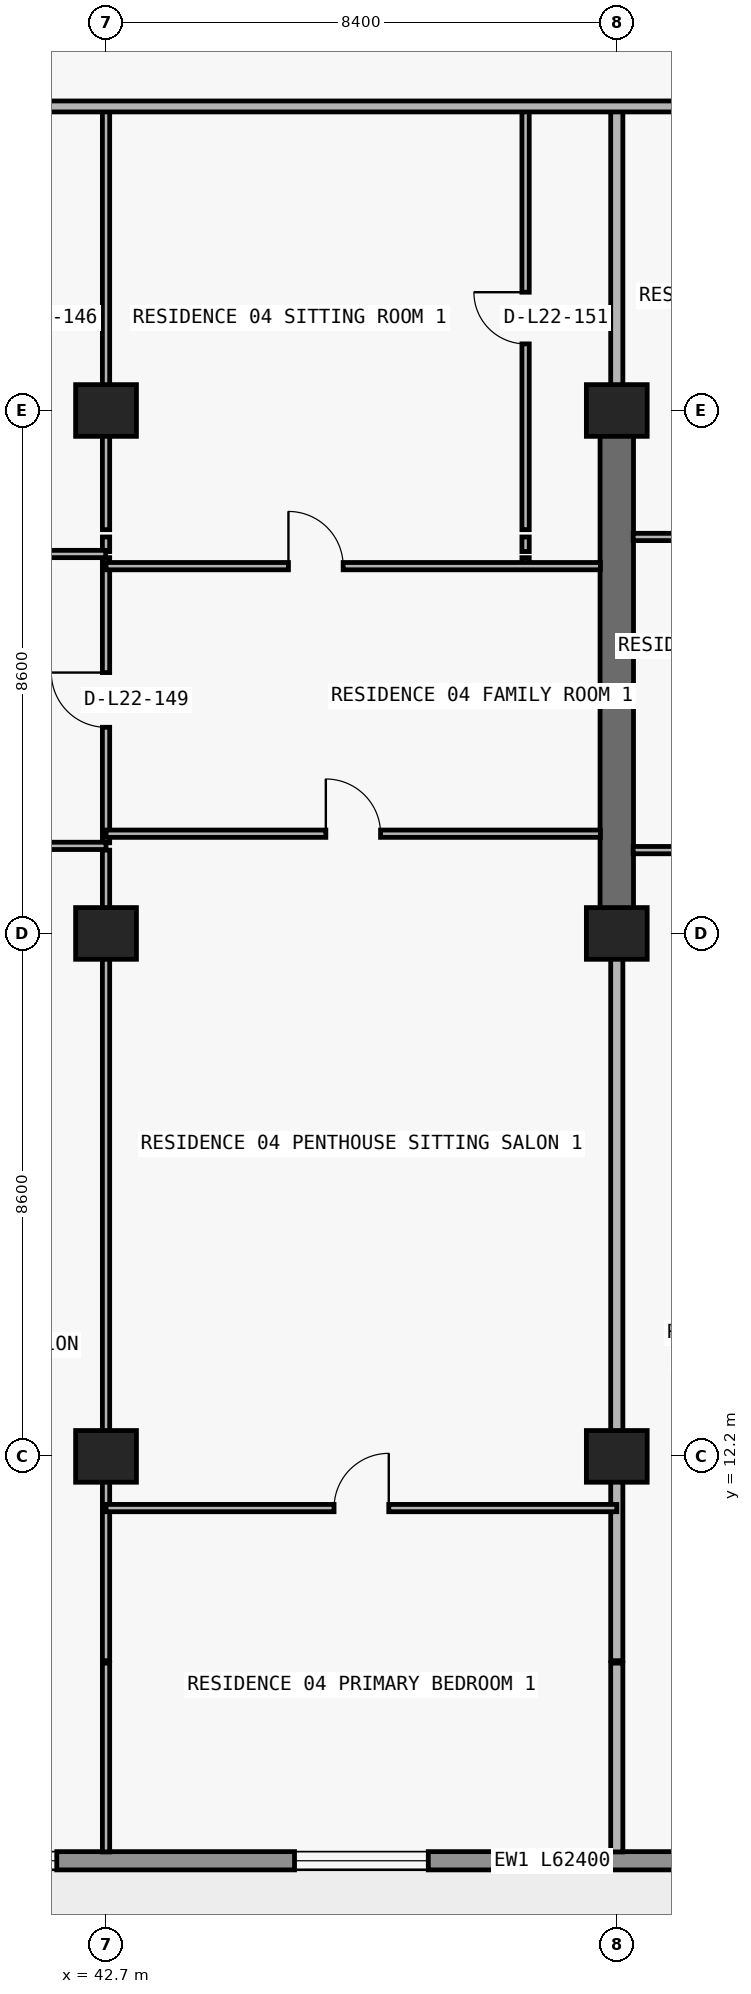
"""IFC4 building model, lengths in metres.
Left out: names, types, materials, properties, quantities, classifications, styles, units other than length and angle.
Written with IfcOpenShell. Run it as: python <this file> out.ifc"""

import sys

from ifc_helpers import new_model, si_unit, direction, frame, frame_2d, origin, origin_2d, place, context, subcontext, project, spatial, rectangle, extrude, element, fill, save


model = new_model("IFC4")
c1 = context("Model", 3, precision=1e-05, world=origin(), true_north=direction((0.0, 1.0)))
c2 = subcontext(c1, "Body", "Model", "MODEL_VIEW")
j1 = project(units=[si_unit("LENGTHUNIT", "METRE"), si_unit("PLANEANGLEUNIT", "RADIAN")], contexts=[c1])
p1 = place(None, origin())
s1 = spatial("IfcSite", under=j1, at=p1, CompositionType="ELEMENT")
p2 = place(p1, origin())
s2 = spatial("IfcBuilding", under=s1, at=p2, CompositionType="ELEMENT")
p3 = place(p2, frame((0.0, 0.0, 84.6)))
s3 = spatial("IfcBuildingStorey", under=s2, at=p3, CompositionType="ELEMENT", Elevation=84.6)
for number, where, z_axis, x_axis in (
    (1, (42.7, 12.2, 0.0), (0.0, 0.0, 1.0), (1.0, 0.0, 0.0)),
    (2, (51.1, 12.2, 0.0), (0.0, 0.0, 1.0), (1.0, 0.0, 0.0)),
    (3, (42.7, 20.8, 0.0), (0.0, 0.0, 1.0), (1.0, 0.0, 0.0)),
    (4, (51.1, 20.8, 0.0), (0.0, 0.0, 1.0), (1.0, 0.0, 0.0)),
    (5, (42.7, 29.4, 0.0), (0.0, 0.0, 1.0), (1.0, 0.0, 0.0)),
    (6, (51.1, 29.4, 0.0), (0.0, 0.0, 1.0), (1.0, 0.0, 0.0)),
):
    element("IfcColumn", number, at=place(p3, frame(where, z_axis=z_axis, x_axis=x_axis)), inside=s3, PredefinedType="COLUMN", context=c2, shape_type="SweptSolid", body=[
        extrude(rectangle(XDim=1.0, YDim=0.85, at=origin_2d()), origin(), (0.0, 0.0, 1.0), 3.05),
    ])
p4 = place(p3, frame((51.1, 20.8, 0.0), z_axis=(0.0, 0.0, 1.0), x_axis=(0.0, 1.0, 0.0)))
e7 = element("IfcWall", 7, at=p4, inside=s3, PredefinedType="SHEAR", context=c2, shape_type="SweptSolid", body=[
    extrude(rectangle(XDim=8.6, YDim=0.55, at=frame_2d((4.3, 0.0))), origin(), (0.0, 0.0, 1.0), 3.05),
])
p5 = place(p3, frame((70.1, 5.55, 0.0), z_axis=(0.0, 0.0, 1.0), x_axis=(-1.0, 0.0, 0.0)))
e8 = element("IfcWall", 8, at=p5, inside=s3, PredefinedType="STANDARD", context=c2, shape_type="SweptSolid", body=[
    extrude(rectangle(XDim=62.4, YDim=0.3, at=frame_2d((31.2, 0.0))), origin(), (0.0, 0.0, 1.0), 3.05),
])
p6 = place(p5, frame((57.226, 0.0, 0.0)))
e9 = element("IfcOpeningElement", 9, at=p6, cuts=e8, PredefinedType="OPENING", context=c2, shape_type="SweptSolid", body=[
    extrude(rectangle(XDim=2.0, YDim=2.3, at=frame_2d((1.0, 1.15))), frame((0.0, 0.16, 0.0), z_axis=(0.0, -1.0, 0.0), x_axis=(1.0, 0.0, 0.0)), (0.0, 0.0, 1.0), 0.32),
])
p7 = place(p5, frame((52.926, 0.0, 0.85)))
e10 = element("IfcOpeningElement", 10, at=p7, cuts=e8, PredefinedType="OPENING", context=c2, shape_type="SweptSolid", body=[
    extrude(rectangle(XDim=2.2, YDim=1.55, at=frame_2d((1.1, 0.775))), frame((0.0, 0.16, 0.0), z_axis=(0.0, -1.0, 0.0), x_axis=(1.0, 0.0, 0.0)), (0.0, 0.0, 1.0), 0.32),
])
p8 = place(p5, frame((48.49, 0.0, 0.0)))
e11 = element("IfcOpeningElement", 11, at=p8, cuts=e8, PredefinedType="OPENING", context=c2, shape_type="SweptSolid", body=[
    extrude(rectangle(XDim=2.0, YDim=2.3, at=frame_2d((1.0, 1.15))), frame((0.0, 0.16, 0.0), z_axis=(0.0, -1.0, 0.0), x_axis=(1.0, 0.0, 0.0)), (0.0, 0.0, 1.0), 0.32),
])
p9 = place(p5, frame((44.39, 0.0, 0.85)))
e12 = element("IfcOpeningElement", 12, at=p9, cuts=e8, PredefinedType="OPENING", context=c2, shape_type="SweptSolid", body=[
    extrude(rectangle(XDim=1.8, YDim=1.55, at=frame_2d((0.9, 0.775))), frame((0.0, 0.16, 0.0), z_axis=(0.0, -1.0, 0.0), x_axis=(1.0, 0.0, 0.0)), (0.0, 0.0, 1.0), 0.32),
])
p10 = place(p5, frame((40.426, 0.0, 0.0)))
e13 = element("IfcOpeningElement", 13, at=p10, cuts=e8, PredefinedType="OPENING", context=c2, shape_type="SweptSolid", body=[
    extrude(rectangle(XDim=2.0, YDim=2.3, at=frame_2d((1.0, 1.15))), frame((0.0, 0.16, 0.0), z_axis=(0.0, -1.0, 0.0), x_axis=(1.0, 0.0, 0.0)), (0.0, 0.0, 1.0), 0.32),
])
p11 = place(p5, frame((36.126, 0.0, 0.85)))
e14 = element("IfcOpeningElement", 14, at=p11, cuts=e8, PredefinedType="OPENING", context=c2, shape_type="SweptSolid", body=[
    extrude(rectangle(XDim=2.2, YDim=1.55, at=frame_2d((1.1, 0.775))), frame((0.0, 0.16, 0.0), z_axis=(0.0, -1.0, 0.0), x_axis=(1.0, 0.0, 0.0)), (0.0, 0.0, 1.0), 0.32),
])
p12 = place(p5, frame((32.09, 0.0, 0.0)))
e15 = element("IfcOpeningElement", 15, at=p12, cuts=e8, PredefinedType="OPENING", context=c2, shape_type="SweptSolid", body=[
    extrude(rectangle(XDim=2.0, YDim=2.3, at=frame_2d((1.0, 1.15))), frame((0.0, 0.16, 0.0), z_axis=(0.0, -1.0, 0.0), x_axis=(1.0, 0.0, 0.0)), (0.0, 0.0, 1.0), 0.32),
])
p13 = place(p5, frame((28.21, 0.0, 0.65)))
e16 = element("IfcOpeningElement", 16, at=p13, cuts=e8, PredefinedType="OPENING", context=c2, shape_type="SweptSolid", body=[
    extrude(rectangle(XDim=2.6, YDim=1.85, at=frame_2d((1.3, 0.925))), frame((0.0, 0.16, 0.0), z_axis=(0.0, -1.0, 0.0), x_axis=(1.0, 0.0, 0.0)), (0.0, 0.0, 1.0), 0.32),
])
p14 = place(p5, frame((22.1, 0.0, 0.85)))
e17 = element("IfcOpeningElement", 17, at=p14, cuts=e8, PredefinedType="OPENING", context=c2, shape_type="SweptSolid", body=[
    extrude(rectangle(XDim=2.2, YDim=1.55, at=frame_2d((1.1, 0.775))), frame((0.0, 0.16, 0.0), z_axis=(0.0, -1.0, 0.0), x_axis=(1.0, 0.0, 0.0)), (0.0, 0.0, 1.0), 0.32),
])
p15 = place(p5, frame((16.026, 0.0, 0.0)))
e18 = element("IfcOpeningElement", 18, at=p15, cuts=e8, PredefinedType="OPENING", context=c2, shape_type="SweptSolid", body=[
    extrude(rectangle(XDim=2.0, YDim=2.3, at=frame_2d((1.0, 1.15))), frame((0.0, 0.16, 0.0), z_axis=(0.0, -1.0, 0.0), x_axis=(1.0, 0.0, 0.0)), (0.0, 0.0, 1.0), 0.32),
])
p16 = place(p5, frame((11.726, 0.0, 0.85)))
e19 = element("IfcOpeningElement", 19, at=p16, cuts=e8, PredefinedType="OPENING", context=c2, shape_type="SweptSolid", body=[
    extrude(rectangle(XDim=2.2, YDim=1.55, at=frame_2d((1.1, 0.775))), frame((0.0, 0.16, 0.0), z_axis=(0.0, -1.0, 0.0), x_axis=(1.0, 0.0, 0.0)), (0.0, 0.0, 1.0), 0.32),
])
p17 = place(p5, frame((7.29, 0.0, 0.0)))
e20 = element("IfcOpeningElement", 20, at=p17, cuts=e8, PredefinedType="OPENING", context=c2, shape_type="SweptSolid", body=[
    extrude(rectangle(XDim=2.0, YDim=2.3, at=frame_2d((1.0, 1.15))), frame((0.0, 0.16, 0.0), z_axis=(0.0, -1.0, 0.0), x_axis=(1.0, 0.0, 0.0)), (0.0, 0.0, 1.0), 0.32),
])
p18 = place(p5, frame((3.19, 0.0, 0.85)))
e21 = element("IfcOpeningElement", 21, at=p18, cuts=e8, PredefinedType="OPENING", context=c2, shape_type="SweptSolid", body=[
    extrude(rectangle(XDim=1.8, YDim=1.55, at=frame_2d((0.9, 0.775))), frame((0.0, 0.16, 0.0), z_axis=(0.0, -1.0, 0.0), x_axis=(1.0, 0.0, 0.0)), (0.0, 0.0, 1.0), 0.32),
])
p19 = place(p3, frame((42.7, 5.695, 0.0), z_axis=(0.0, 0.0, 1.0), x_axis=(0.0, 1.0, 0.0)))
e22 = element("IfcWall", 22, at=p19, inside=s3, PredefinedType="PARTITIONING", context=c2, shape_type="SweptSolid", body=[
    extrude(rectangle(XDim=3.105, YDim=0.12, at=frame_2d((1.552, 0.0))), origin(), (0.0, 0.0, 1.0), 3.05),
])
p20 = place(p3, frame((42.7, 8.84, 0.0), z_axis=(0.0, 0.0, 1.0), x_axis=(0.0, 1.0, 0.0)))
e23 = element("IfcWall", 23, at=p20, inside=s3, PredefinedType="PARTITIONING", context=c2, shape_type="SweptSolid", body=[
    extrude(rectangle(XDim=13.33, YDim=0.12, at=frame_2d((6.665, 0.0))), origin(), (0.0, 0.0, 1.0), 2.174),
])
p21 = place(p3, frame((42.7, 22.29, 0.0), z_axis=(0.0, 0.0, 1.0), x_axis=(0.0, 1.0, 0.0)))
e24 = element("IfcWall", 24, at=p21, inside=s3, PredefinedType="PARTITIONING", context=c2, shape_type="SweptSolid", body=[
    extrude(rectangle(XDim=4.69, YDim=0.12, at=frame_2d((2.345, 0.0))), origin(), (0.0, 0.0, 1.0), 2.174),
])
p22 = place(p21, frame((1.9, 0.0, 0.0)))
e25 = element("IfcOpeningElement", 25, at=p22, cuts=e24, PredefinedType="OPENING", context=c2, shape_type="SweptSolid", body=[
    extrude(rectangle(XDim=0.9, YDim=2.124, at=frame_2d((0.45, 1.062))), frame((0.0, 0.07, 0.0), z_axis=(0.0, -1.0, 0.0), x_axis=(1.0, 0.0, 0.0)), (0.0, 0.0, 1.0), 0.14),
])
p23 = place(p3, frame((42.7, 27.08, 0.0), z_axis=(0.0, 0.0, 1.0), x_axis=(0.0, 1.0, 0.0)))
e26 = element("IfcWall", 26, at=p23, inside=s3, PredefinedType="PARTITIONING", context=c2, shape_type="SweptSolid", body=[
    extrude(rectangle(XDim=0.24, YDim=0.12, at=frame_2d((0.12, 0.0))), origin(), (0.0, 0.0, 1.0), 2.174),
])
p24 = place(p3, frame((42.7, 27.44, 0.0), z_axis=(0.0, 0.0, 1.0), x_axis=(0.0, 1.0, 0.0)))
e27 = element("IfcWall", 27, at=p24, inside=s3, PredefinedType="PARTITIONING", context=c2, shape_type="SweptSolid", body=[
    extrude(rectangle(XDim=6.96, YDim=0.12, at=frame_2d((3.48, 0.0))), origin(), (0.0, 0.0, 1.0), 2.174),
])
p25 = place(p3, frame((49.6, 26.84, 0.0), z_axis=(0.0, 0.0, 1.0), x_axis=(0.0, 1.0, 0.0)))
e28 = element("IfcWall", 28, at=p25, inside=s3, PredefinedType="PARTITIONING", context=c2, shape_type="SweptSolid", body=[
    extrude(rectangle(XDim=0.14, YDim=0.12, at=frame_2d((0.07, 0.0))), origin(), (0.0, 0.0, 1.0), 3.05),
])
p26 = place(p3, frame((49.6, 27.08, 0.0), z_axis=(0.0, 0.0, 1.0), x_axis=(0.0, 1.0, 0.0)))
e29 = element("IfcWall", 29, at=p26, inside=s3, PredefinedType="PARTITIONING", context=c2, shape_type="SweptSolid", body=[
    extrude(rectangle(XDim=0.24, YDim=0.12, at=frame_2d((0.12, 0.0))), origin(), (0.0, 0.0, 1.0), 3.05),
])
p27 = place(p3, frame((49.6, 27.44, 0.0), z_axis=(0.0, 0.0, 1.0), x_axis=(0.0, 1.0, 0.0)))
e30 = element("IfcWall", 30, at=p27, inside=s3, PredefinedType="PARTITIONING", context=c2, shape_type="SweptSolid", body=[
    extrude(rectangle(XDim=6.96, YDim=0.12, at=frame_2d((3.48, 0.0))), origin(), (0.0, 0.0, 1.0), 3.05),
])
p28 = place(p27, frame((3.055, 0.0, 0.0)))
e31 = element("IfcOpeningElement", 31, at=p28, cuts=e30, PredefinedType="OPENING", context=c2, shape_type="SweptSolid", body=[
    extrude(rectangle(XDim=0.85, YDim=2.1, at=frame_2d((0.425, 1.05))), frame((0.0, 0.07, 0.0), z_axis=(0.0, -1.0, 0.0), x_axis=(1.0, 0.0, 0.0)), (0.0, 0.0, 1.0), 0.14),
])
p29 = place(p3, frame((51.1, 5.695, 0.0), z_axis=(0.0, 0.0, 1.0), x_axis=(0.0, 1.0, 0.0)))
e32 = element("IfcWall", 32, at=p29, inside=s3, PredefinedType="PARTITIONING", context=c2, shape_type="SweptSolid", body=[
    extrude(rectangle(XDim=3.105, YDim=0.2, at=frame_2d((1.552, 0.0))), origin(), (0.0, 0.0, 1.0), 3.05),
])
p30 = place(p3, frame((51.1, 8.84, 0.0), z_axis=(0.0, 0.0, 1.0), x_axis=(0.0, 1.0, 0.0)))
e33 = element("IfcWall", 33, at=p30, inside=s3, PredefinedType="PARTITIONING", context=c2, shape_type="SweptSolid", body=[
    extrude(rectangle(XDim=11.955, YDim=0.2, at=frame_2d((5.978, 0.0))), origin(), (0.0, 0.0, 1.0), 2.174),
])
p31 = place(p3, frame((51.1, 29.405, 0.0), z_axis=(0.0, 0.0, 1.0), x_axis=(0.0, 1.0, 0.0)))
e34 = element("IfcWall", 34, at=p31, inside=s3, PredefinedType="PARTITIONING", context=c2, shape_type="SweptSolid", body=[
    extrude(rectangle(XDim=4.995, YDim=0.2, at=frame_2d((2.498, 0.0))), origin(), (0.0, 0.0, 1.0), 2.335),
])
p32 = place(p3, frame((42.7, 11.35, 0.0), z_axis=(0.0, 0.0, 1.0), x_axis=(1.0, 0.0, 0.0)))
e35 = element("IfcWall", 35, at=p32, inside=s3, PredefinedType="PARTITIONING", context=c2, shape_type="SweptSolid", body=[
    extrude(rectangle(XDim=8.4, YDim=0.12, at=frame_2d((4.2, 0.0))), origin(), (0.0, 0.0, 1.0), 3.05),
])
p33 = place(p32, frame((3.75, 0.0, 0.0)))
e36 = element("IfcOpeningElement", 36, at=p33, cuts=e35, PredefinedType="OPENING", context=c2, shape_type="SweptSolid", body=[
    extrude(rectangle(XDim=0.9, YDim=2.15, at=frame_2d((0.45, 1.075))), frame((0.0, 0.07, 0.0), z_axis=(0.0, -1.0, 0.0), x_axis=(1.0, 0.0, 0.0)), (0.0, 0.0, 1.0), 0.14),
])
p34 = place(p3, frame((51.37, 22.17, 0.0), z_axis=(0.0, 0.0, 1.0), x_axis=(1.0, 0.0, 0.0)))
e37 = element("IfcWall", 37, at=p34, inside=s3, PredefinedType="PARTITIONING", context=c2, shape_type="SweptSolid", body=[
    extrude(rectangle(XDim=4.516, YDim=0.12, at=frame_2d((2.258, 0.0))), origin(), (0.0, 0.0, 1.0), 3.05),
])
p35 = place(p34, frame((1.389, 0.0, 0.0)))
e38 = element("IfcOpeningElement", 38, at=p35, cuts=e37, PredefinedType="OPENING", context=c2, shape_type="SweptSolid", body=[
    extrude(rectangle(XDim=0.9, YDim=2.15, at=frame_2d((0.45, 1.075))), frame((0.0, 0.07, 0.0), z_axis=(0.0, -1.0, 0.0), x_axis=(1.0, 0.0, 0.0)), (0.0, 0.0, 1.0), 0.14),
])
p36 = place(p3, frame((35.1, 22.24, 0.0), z_axis=(0.0, 0.0, 1.0), x_axis=(1.0, 0.0, 0.0)))
e39 = element("IfcWall", 39, at=p36, inside=s3, PredefinedType="PARTITIONING", context=c2, shape_type="SweptSolid", body=[
    extrude(rectangle(XDim=7.6, YDim=0.12, at=frame_2d((3.8, 0.0))), origin(), (0.0, 0.0, 1.0), 3.05),
])
p37 = place(p36, frame((3.35, 0.0, 0.0)))
e40 = element("IfcOpeningElement", 40, at=p37, cuts=e39, PredefinedType="OPENING", context=c2, shape_type="SweptSolid", body=[
    extrude(rectangle(XDim=0.9, YDim=2.15, at=frame_2d((0.45, 1.075))), frame((0.0, 0.07, 0.0), z_axis=(0.0, -1.0, 0.0), x_axis=(1.0, 0.0, 0.0)), (0.0, 0.0, 1.0), 0.14),
])
p38 = place(p3, frame((42.7, 22.44, 0.0), z_axis=(0.0, 0.0, 1.0), x_axis=(1.0, 0.0, 0.0)))
e41 = element("IfcWall", 41, at=p38, inside=s3, PredefinedType="PARTITIONING", context=c2, shape_type="SweptSolid", body=[
    extrude(rectangle(XDim=8.13, YDim=0.12, at=frame_2d((4.065, 0.0))), origin(), (0.0, 0.0, 1.0), 3.05),
])
p39 = place(p38, frame((3.615, 0.0, 0.0)))
e42 = element("IfcOpeningElement", 42, at=p39, cuts=e41, PredefinedType="OPENING", context=c2, shape_type="SweptSolid", body=[
    extrude(rectangle(XDim=0.9, YDim=2.15, at=frame_2d((0.45, 1.075))), frame((0.0, 0.07, 0.0), z_axis=(0.0, -1.0, 0.0), x_axis=(1.0, 0.0, 0.0)), (0.0, 0.0, 1.0), 0.14),
])
p40 = place(p3, frame((42.7, 26.84, 0.0), z_axis=(0.0, 0.0, 1.0), x_axis=(1.0, 0.0, 0.0)))
e43 = element("IfcWall", 43, at=p40, inside=s3, PredefinedType="PARTITIONING", context=c2, shape_type="SweptSolid", body=[
    extrude(rectangle(XDim=8.13, YDim=0.12, at=frame_2d((4.065, 0.0))), origin(), (0.0, 0.0, 1.0), 3.05),
])
p41 = place(p40, frame((3.0, 0.0, 0.0)))
e44 = element("IfcOpeningElement", 44, at=p41, cuts=e43, PredefinedType="OPENING", context=c2, shape_type="SweptSolid", body=[
    extrude(rectangle(XDim=0.9, YDim=2.15, at=frame_2d((0.45, 1.075))), frame((0.0, 0.07, 0.0), z_axis=(0.0, -1.0, 0.0), x_axis=(1.0, 0.0, 0.0)), (0.0, 0.0, 1.0), 0.14),
])
p42 = place(p3, frame((35.1, 27.04, 0.0), z_axis=(0.0, 0.0, 1.0), x_axis=(1.0, 0.0, 0.0)))
e45 = element("IfcWall", 45, at=p42, inside=s3, PredefinedType="PARTITIONING", context=c2, shape_type="SweptSolid", body=[
    extrude(rectangle(XDim=7.595, YDim=0.12, at=frame_2d((3.797, 0.0))), origin(), (0.0, 0.0, 1.0), 3.05),
])
p43 = place(p42, frame((2.6, 0.0, 0.0)))
e46 = element("IfcOpeningElement", 46, at=p43, cuts=e45, PredefinedType="OPENING", context=c2, shape_type="SweptSolid", body=[
    extrude(rectangle(XDim=0.9, YDim=2.15, at=frame_2d((0.45, 1.075))), frame((0.0, 0.07, 0.0), z_axis=(0.0, -1.0, 0.0), x_axis=(1.0, 0.0, 0.0)), (0.0, 0.0, 1.0), 0.14),
])
p44 = place(p3, frame((51.37, 27.32, 0.0), z_axis=(0.0, 0.0, 1.0), x_axis=(1.0, 0.0, 0.0)))
e47 = element("IfcWall", 47, at=p44, inside=s3, PredefinedType="PARTITIONING", context=c2, shape_type="SweptSolid", body=[
    extrude(rectangle(XDim=4.516, YDim=0.12, at=frame_2d((2.258, 0.0))), origin(), (0.0, 0.0, 1.0), 3.05),
])
p45 = place(p44, frame((1.808, 0.0, 0.0)))
e48 = element("IfcOpeningElement", 48, at=p45, cuts=e47, PredefinedType="OPENING", context=c2, shape_type="SweptSolid", body=[
    extrude(rectangle(XDim=0.9, YDim=2.15, at=frame_2d((0.45, 1.075))), frame((0.0, 0.07, 0.0), z_axis=(0.0, -1.0, 0.0), x_axis=(1.0, 0.0, 0.0)), (0.0, 0.0, 1.0), 0.14),
])
p46 = place(p3, frame((26.7, 34.4, 0.0), z_axis=(0.0, 0.0, 1.0), x_axis=(1.0, 0.0, 0.0)))
e49 = element("IfcWall", 49, at=p46, inside=s3, PredefinedType="PARTITIONING", context=c2, shape_type="SweptSolid", body=[
    extrude(rectangle(XDim=29.186, YDim=0.18, at=frame_2d((14.593, 0.0))), origin(), (0.0, 0.0, 1.0), 3.05),
])
p47 = place(p46, frame((2.875, 0.0, 0.0)))
e50 = element("IfcOpeningElement", 50, at=p47, cuts=e49, PredefinedType="OPENING", context=c2, shape_type="SweptSolid", body=[
    extrude(rectangle(XDim=1.0, YDim=2.2, at=frame_2d((0.5, 1.1))), frame((0.0, 0.1, 0.0), z_axis=(0.0, -1.0, 0.0), x_axis=(1.0, 0.0, 0.0)), (0.0, 0.0, 1.0), 0.2),
])
p48 = place(p46, frame((10.95, 0.0, 0.0)))
e51 = element("IfcOpeningElement", 51, at=p48, cuts=e49, PredefinedType="OPENING", context=c2, shape_type="SweptSolid", body=[
    extrude(rectangle(XDim=1.0, YDim=2.2, at=frame_2d((0.5, 1.1))), frame((0.0, 0.1, 0.0), z_axis=(0.0, -1.0, 0.0), x_axis=(1.0, 0.0, 0.0)), (0.0, 0.0, 1.0), 0.2),
])
p49 = place(p46, frame((26.293, 0.0, 0.0)))
e52 = element("IfcOpeningElement", 52, at=p49, cuts=e49, PredefinedType="OPENING", context=c2, shape_type="SweptSolid", body=[
    extrude(rectangle(XDim=1.0, YDim=2.2, at=frame_2d((0.5, 1.1))), frame((0.0, 0.1, 0.0), z_axis=(0.0, -1.0, 0.0), x_axis=(1.0, 0.0, 0.0)), (0.0, 0.0, 1.0), 0.2),
])
p50 = place(p13, origin())
e53 = element("IfcWindow", 53, at=p50, inside=s3, PartitioningType="SINGLE_PANEL", PredefinedType="WINDOW", context=c2, shape_type="SweptSolid", body=[
    extrude(rectangle(XDim=2.6, YDim=1.85, at=frame_2d((1.3, 0.925))), frame((0.0, 0.03, 0.0), z_axis=(0.0, -1.0, 0.0), x_axis=(1.0, 0.0, 0.0)), (0.0, 0.0, 1.0), 0.06),
])
fill(e16, e53)
p51 = place(p14, origin())
e54 = element("IfcWindow", 54, at=p51, inside=s3, PartitioningType="SINGLE_PANEL", PredefinedType="WINDOW", context=c2, shape_type="SweptSolid", body=[
    extrude(rectangle(XDim=2.2, YDim=1.55, at=frame_2d((1.1, 0.775))), frame((0.0, 0.03, 0.0), z_axis=(0.0, -1.0, 0.0), x_axis=(1.0, 0.0, 0.0)), (0.0, 0.0, 1.0), 0.06),
])
fill(e17, e54)
p52 = place(p22, origin())
e55 = element("IfcDoor", 55, at=p52, inside=s3, OperationType="SINGLE_SWING_RIGHT", PredefinedType="DOOR", context=c2, shape_type="SweptSolid", body=[
    extrude(rectangle(XDim=0.9, YDim=2.124, at=frame_2d((0.45, 1.062))), frame((0.0, 0.025, 0.0), z_axis=(0.0, -1.0, 0.0), x_axis=(1.0, 0.0, 0.0)), (0.0, 0.0, 1.0), 0.05),
])
fill(e25, e55)
p53 = place(p41, origin())
e56 = element("IfcDoor", 56, at=p53, inside=s3, OperationType="SINGLE_SWING_LEFT", PredefinedType="DOOR", context=c2, shape_type="SweptSolid", body=[
    extrude(rectangle(XDim=0.9, YDim=2.15, at=frame_2d((0.45, 1.075))), frame((0.0, 0.025, 0.0), z_axis=(0.0, -1.0, 0.0), x_axis=(1.0, 0.0, 0.0)), (0.0, 0.0, 1.0), 0.05),
])
fill(e44, e56)
p54 = place(p28, origin())
e57 = element("IfcDoor", 57, at=p54, inside=s3, OperationType="SINGLE_SWING_RIGHT", PredefinedType="DOOR", context=c2, shape_type="SweptSolid", body=[
    extrude(rectangle(XDim=0.85, YDim=2.1, at=frame_2d((0.425, 1.05))), frame((0.0, 0.025, 0.0), z_axis=(0.0, -1.0, 0.0), x_axis=(1.0, 0.0, 0.0)), (0.0, 0.0, 1.0), 0.05),
])
fill(e31, e57)
p55 = place(p39, origin())
e58 = element("IfcDoor", 58, at=p55, inside=s3, OperationType="SINGLE_SWING_LEFT", PredefinedType="DOOR", context=c2, shape_type="SweptSolid", body=[
    extrude(rectangle(XDim=0.9, YDim=2.15, at=frame_2d((0.45, 1.075))), frame((0.0, 0.025, 0.0), z_axis=(0.0, -1.0, 0.0), x_axis=(1.0, 0.0, 0.0)), (0.0, 0.0, 1.0), 0.05),
])
fill(e42, e58)
p56 = place(p33, origin())
e59 = element("IfcDoor", 59, at=p56, inside=s3, OperationType="SINGLE_SWING_RIGHT", PredefinedType="DOOR", context=c2, shape_type="SweptSolid", body=[
    extrude(rectangle(XDim=0.9, YDim=2.15, at=frame_2d((0.45, 1.075))), frame((0.0, 0.025, 0.0), z_axis=(0.0, -1.0, 0.0), x_axis=(1.0, 0.0, 0.0)), (0.0, 0.0, 1.0), 0.05),
])
fill(e36, e59)
save(model, sys.argv[1])
